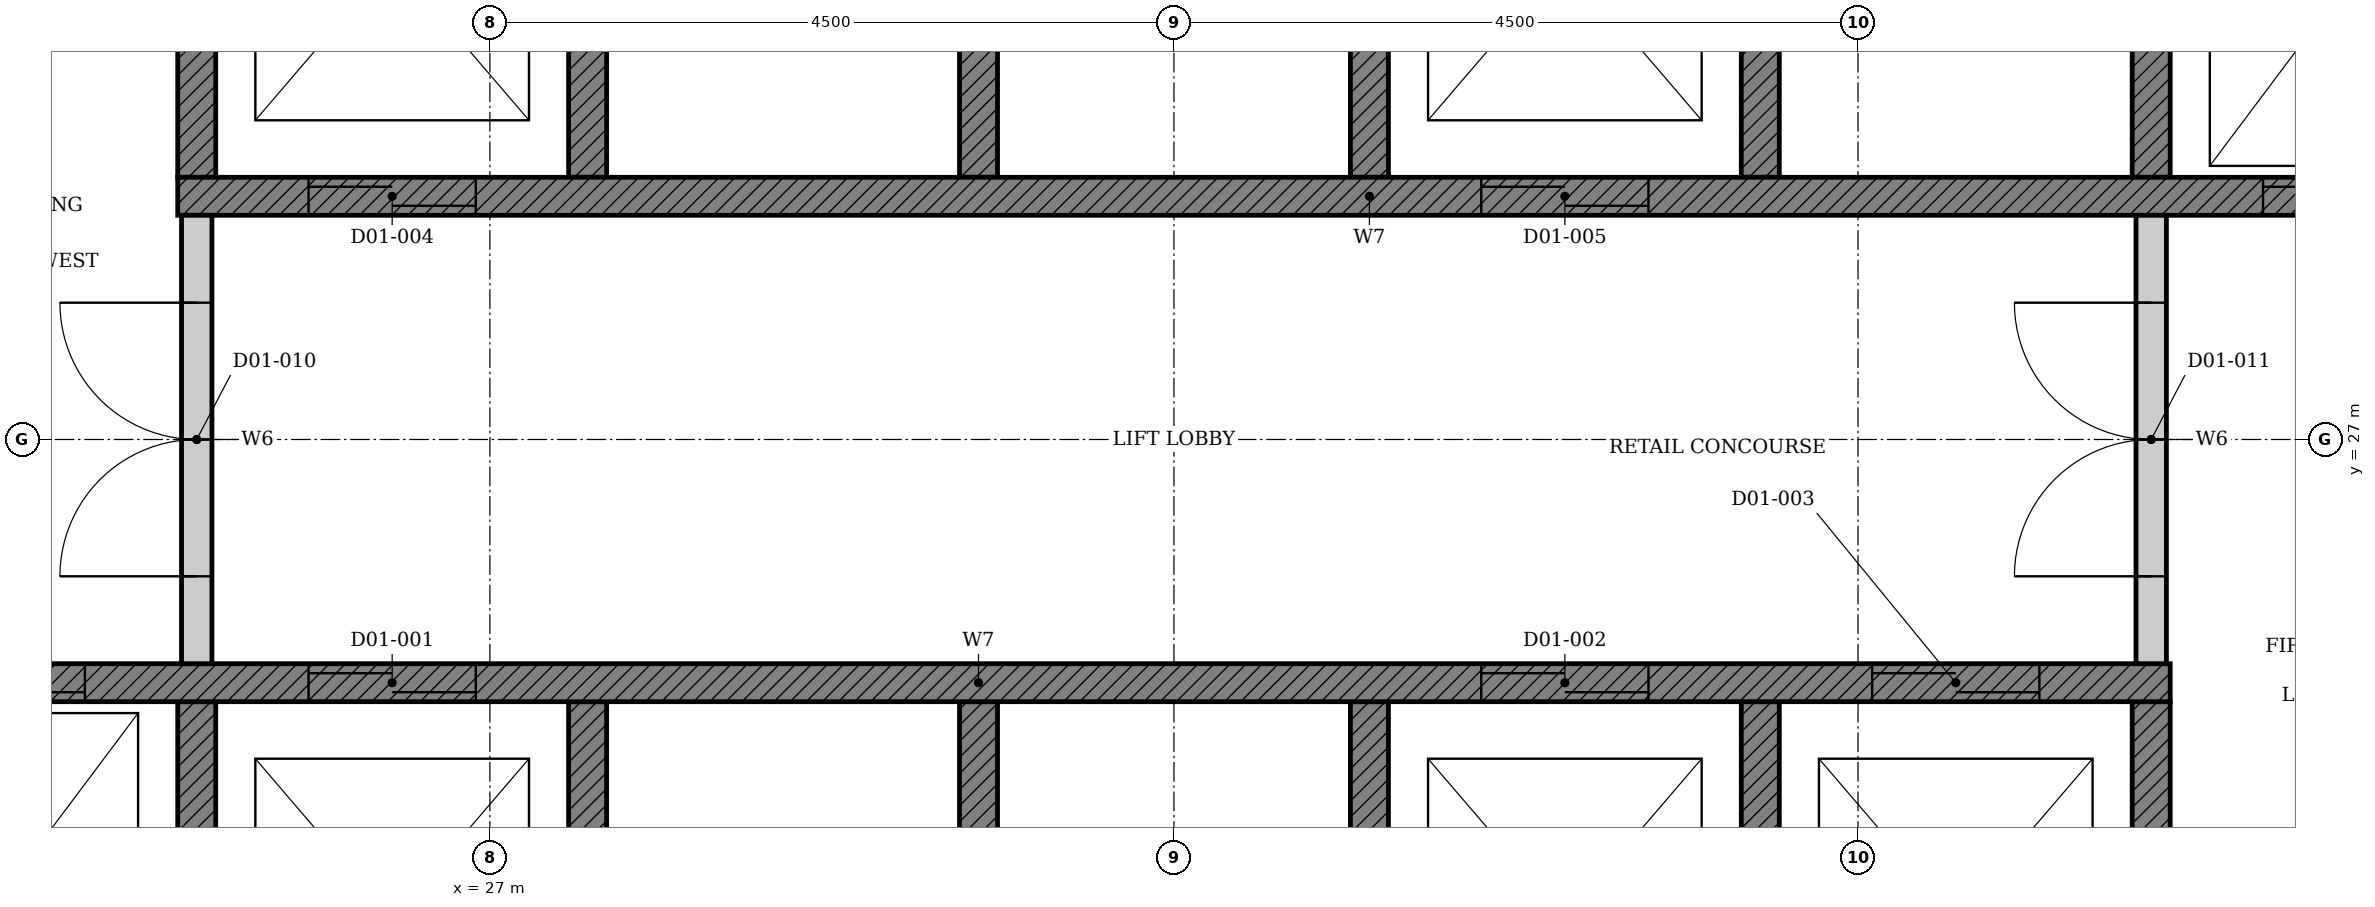
"""IFC4 building model, lengths in metres.
Left out: names, types, materials, properties, quantities, classifications, styles, units other than length and angle.
Written with IfcOpenShell. Run it as: python <this file> out.ifc"""

import sys

from ifc_helpers import new_model, si_unit, direction, frame, frame_2d, origin, place, context, subcontext, project, spatial, polyline, rectangle, outline, extrude, element, fill, save


model = new_model("IFC4")
c1 = context("Model", 3, precision=1e-05, world=origin(), true_north=direction((0.0, 1.0)))
c2 = subcontext(c1, "Body", "Model", "MODEL_VIEW")
j1 = project(units=[si_unit("LENGTHUNIT", "METRE"), si_unit("PLANEANGLEUNIT", "RADIAN")], contexts=[c1])
p1 = place(None, origin())
s1 = spatial("IfcSite", under=j1, at=p1, CompositionType="ELEMENT")
p2 = place(p1, origin())
s2 = spatial("IfcBuilding", under=s1, at=p2, CompositionType="ELEMENT")
p3 = place(p2, frame((0.0, 0.0, 6.6)))
s3 = spatial("IfcBuildingStorey", under=s2, at=p3, CompositionType="ELEMENT", Elevation=6.6)
p4 = place(p3, origin())
e1 = element("IfcWall", 1, at=p4, inside=s3, PredefinedType="SHEAR", context=c2, shape_type="SweptSolid", body=[
    extrude(outline(polyline([(22.375, 22.35), (38.053, 22.35), (38.053, 25.275), (37.803, 25.275), (37.803, 22.65), (35.482, 22.65), (35.482, 25.275), (35.232, 25.275), (35.232, 22.65), (32.911, 22.65), (32.911, 25.275), (32.661, 25.275), (32.661, 22.65), (30.339, 22.65), (30.339, 25.275), (30.089, 25.275), (30.089, 22.65), (27.768, 22.65), (27.768, 25.275), (27.518, 25.275), (27.518, 22.65), (25.197, 22.65), (25.197, 25.275), (24.947, 25.275), (24.947, 22.65), (22.625, 22.65), (22.625, 25.275), (22.375, 25.275), (22.375, 22.35)])), origin(), (0.0, 0.0, 1.0), 5.05),
])
p5 = place(p3, origin())
e2 = element("IfcWall", 2, at=p5, inside=s3, PredefinedType="SHEAR", context=c2, shape_type="SweptSolid", body=[
    extrude(outline(polyline([(24.947, 28.725), (25.197, 28.725), (25.197, 31.35), (27.518, 31.35), (27.518, 28.725), (27.768, 28.725), (27.768, 31.35), (30.089, 31.35), (30.089, 28.725), (30.339, 28.725), (30.339, 31.35), (32.661, 31.35), (32.661, 28.725), (32.911, 28.725), (32.911, 31.35), (35.232, 31.35), (35.232, 28.725), (35.482, 28.725), (35.482, 31.35), (37.803, 31.35), (37.803, 28.725), (38.053, 28.725), (38.053, 31.35), (40.375, 31.35), (40.375, 28.725), (40.625, 28.725), (40.625, 31.65), (24.947, 31.65), (24.947, 28.725)])), origin(), (0.0, 0.0, 1.0), 5.05),
])
p6 = place(p3, frame((22.375, 25.4, 0.0), z_axis=(0.0, 0.0, 1.0), x_axis=(1.0, 0.0, 0.0)))
e3 = element("IfcWall", 3, at=p6, inside=s3, PredefinedType="SHEAR", context=c2, shape_type="SweptSolid", body=[
    extrude(rectangle(XDim=15.678, YDim=0.25, at=frame_2d((7.839, 0.0))), origin(), (0.0, 0.0, 1.0), 5.05),
])
p7 = place(p6, frame((3.432, 0.0, 0.0)))
e4 = element("IfcOpeningElement", 4, at=p7, cuts=e3, PredefinedType="OPENING", context=c2, shape_type="SweptSolid", body=[
    extrude(rectangle(XDim=1.1, YDim=2.1, at=frame_2d((0.55, 1.05))), frame((0.0, 0.135, 0.0), z_axis=(0.0, -1.0, 0.0), x_axis=(1.0, 0.0, 0.0)), (0.0, 0.0, 1.0), 0.27),
])
p8 = place(p6, frame((11.146, 0.0, 0.0)))
e5 = element("IfcOpeningElement", 5, at=p8, cuts=e3, PredefinedType="OPENING", context=c2, shape_type="SweptSolid", body=[
    extrude(rectangle(XDim=1.1, YDim=2.1, at=frame_2d((0.55, 1.05))), frame((0.0, 0.135, 0.0), z_axis=(0.0, -1.0, 0.0), x_axis=(1.0, 0.0, 0.0)), (0.0, 0.0, 1.0), 0.27),
])
p9 = place(p6, frame((13.718, 0.0, 0.0)))
e6 = element("IfcOpeningElement", 6, at=p9, cuts=e3, PredefinedType="OPENING", context=c2, shape_type="SweptSolid", body=[
    extrude(rectangle(XDim=1.1, YDim=2.1, at=frame_2d((0.55, 1.05))), frame((0.0, 0.135, 0.0), z_axis=(0.0, -1.0, 0.0), x_axis=(1.0, 0.0, 0.0)), (0.0, 0.0, 1.0), 0.27),
])
p10 = place(p6, frame((0.861, 0.0, 0.0)))
e7 = element("IfcOpeningElement", 7, at=p10, cuts=e3, PredefinedType="OPENING", context=c2, shape_type="SweptSolid", body=[
    extrude(rectangle(XDim=1.1, YDim=2.1, at=frame_2d((0.55, 1.05))), frame((0.0, 0.135, 0.0), z_axis=(0.0, -1.0, 0.0), x_axis=(1.0, 0.0, 0.0)), (0.0, 0.0, 1.0), 0.27),
])
p11 = place(p3, frame((24.947, 28.6, 0.0), z_axis=(0.0, 0.0, 1.0), x_axis=(1.0, 0.0, 0.0)))
e8 = element("IfcWall", 8, at=p11, inside=s3, PredefinedType="SHEAR", context=c2, shape_type="SweptSolid", body=[
    extrude(rectangle(XDim=15.678, YDim=0.25, at=frame_2d((7.839, 0.0))), origin(), (0.0, 0.0, 1.0), 5.05),
])
p12 = place(p11, frame((0.861, 0.0, 0.0)))
e9 = element("IfcOpeningElement", 9, at=p12, cuts=e8, PredefinedType="OPENING", context=c2, shape_type="SweptSolid", body=[
    extrude(rectangle(XDim=1.1, YDim=2.1, at=frame_2d((0.55, 1.05))), frame((0.0, 0.135, 0.0), z_axis=(0.0, -1.0, 0.0), x_axis=(1.0, 0.0, 0.0)), (0.0, 0.0, 1.0), 0.27),
])
p13 = place(p11, frame((8.575, 0.0, 0.0)))
e10 = element("IfcOpeningElement", 10, at=p13, cuts=e8, PredefinedType="OPENING", context=c2, shape_type="SweptSolid", body=[
    extrude(rectangle(XDim=1.1, YDim=2.1, at=frame_2d((0.55, 1.05))), frame((0.0, 0.135, 0.0), z_axis=(0.0, -1.0, 0.0), x_axis=(1.0, 0.0, 0.0)), (0.0, 0.0, 1.0), 0.27),
])
p14 = place(p11, frame((13.718, 0.0, 0.0)))
e11 = element("IfcOpeningElement", 11, at=p14, cuts=e8, PredefinedType="OPENING", context=c2, shape_type="SweptSolid", body=[
    extrude(rectangle(XDim=1.1, YDim=2.1, at=frame_2d((0.55, 1.05))), frame((0.0, 0.135, 0.0), z_axis=(0.0, -1.0, 0.0), x_axis=(1.0, 0.0, 0.0)), (0.0, 0.0, 1.0), 0.27),
])
p15 = place(p3, frame((25.072, 25.525, 0.0), z_axis=(0.0, 0.0, 1.0), x_axis=(0.0, 1.0, 0.0)))
e12 = element("IfcWall", 12, at=p15, inside=s3, PredefinedType="PARTITIONING", context=c2, shape_type="SweptSolid", body=[
    extrude(rectangle(XDim=2.95, YDim=0.2, at=frame_2d((1.475, 0.0))), origin(), (0.0, 0.0, 1.0), 5.05),
])
p16 = place(p15, frame((0.575, 0.0, 0.0)))
e13 = element("IfcOpeningElement", 13, at=p16, cuts=e12, PredefinedType="OPENING", context=c2, shape_type="SweptSolid", body=[
    extrude(rectangle(XDim=1.8, YDim=2.1, at=frame_2d((0.9, 1.05))), frame((0.0, 0.11, 0.0), z_axis=(0.0, -1.0, 0.0), x_axis=(1.0, 0.0, 0.0)), (0.0, 0.0, 1.0), 0.22),
])
p17 = place(p3, frame((37.928, 25.525, 0.0), z_axis=(0.0, 0.0, 1.0), x_axis=(0.0, 1.0, 0.0)))
e14 = element("IfcWall", 14, at=p17, inside=s3, PredefinedType="PARTITIONING", context=c2, shape_type="SweptSolid", body=[
    extrude(rectangle(XDim=2.95, YDim=0.2, at=frame_2d((1.475, 0.0))), origin(), (0.0, 0.0, 1.0), 5.05),
])
p18 = place(p17, frame((0.575, 0.0, 0.0)))
e15 = element("IfcOpeningElement", 15, at=p18, cuts=e14, PredefinedType="OPENING", context=c2, shape_type="SweptSolid", body=[
    extrude(rectangle(XDim=1.8, YDim=2.1, at=frame_2d((0.9, 1.05))), frame((0.0, 0.11, 0.0), z_axis=(0.0, -1.0, 0.0), x_axis=(1.0, 0.0, 0.0)), (0.0, 0.0, 1.0), 0.22),
])
p19 = place(p7, origin())
e16 = element("IfcDoor", 16, at=p19, inside=s3, OperationType="DOUBLE_DOOR_SLIDING", PredefinedType="DOOR", context=c2, shape_type="SweptSolid", body=[
    extrude(rectangle(XDim=1.1, YDim=2.1, at=frame_2d((0.55, 1.05))), frame((0.0, 0.025, 0.0), z_axis=(0.0, -1.0, 0.0), x_axis=(1.0, 0.0, 0.0)), (0.0, 0.0, 1.0), 0.05),
])
fill(e4, e16)
p20 = place(p8, origin())
e17 = element("IfcDoor", 17, at=p20, inside=s3, OperationType="DOUBLE_DOOR_SLIDING", PredefinedType="DOOR", context=c2, shape_type="SweptSolid", body=[
    extrude(rectangle(XDim=1.1, YDim=2.1, at=frame_2d((0.55, 1.05))), frame((0.0, 0.025, 0.0), z_axis=(0.0, -1.0, 0.0), x_axis=(1.0, 0.0, 0.0)), (0.0, 0.0, 1.0), 0.05),
])
fill(e5, e17)
p21 = place(p9, origin())
e18 = element("IfcDoor", 18, at=p21, inside=s3, OperationType="DOUBLE_DOOR_SLIDING", PredefinedType="DOOR", context=c2, shape_type="SweptSolid", body=[
    extrude(rectangle(XDim=1.1, YDim=2.1, at=frame_2d((0.55, 1.05))), frame((0.0, 0.025, 0.0), z_axis=(0.0, -1.0, 0.0), x_axis=(1.0, 0.0, 0.0)), (0.0, 0.0, 1.0), 0.05),
])
fill(e6, e18)
p22 = place(p12, origin())
e19 = element("IfcDoor", 19, at=p22, inside=s3, OperationType="DOUBLE_DOOR_SLIDING", PredefinedType="DOOR", context=c2, shape_type="SweptSolid", body=[
    extrude(rectangle(XDim=1.1, YDim=2.1, at=frame_2d((0.55, 1.05))), frame((0.0, 0.025, 0.0), z_axis=(0.0, -1.0, 0.0), x_axis=(1.0, 0.0, 0.0)), (0.0, 0.0, 1.0), 0.05),
])
fill(e9, e19)
p23 = place(p13, origin())
e20 = element("IfcDoor", 20, at=p23, inside=s3, OperationType="DOUBLE_DOOR_SLIDING", PredefinedType="DOOR", context=c2, shape_type="SweptSolid", body=[
    extrude(rectangle(XDim=1.1, YDim=2.1, at=frame_2d((0.55, 1.05))), frame((0.0, 0.025, 0.0), z_axis=(0.0, -1.0, 0.0), x_axis=(1.0, 0.0, 0.0)), (0.0, 0.0, 1.0), 0.05),
])
fill(e10, e20)
p24 = place(p10, origin())
e21 = element("IfcDoor", 21, at=p24, inside=s3, OperationType="DOUBLE_DOOR_SLIDING", PredefinedType="DOOR", context=c2, shape_type="SweptSolid", body=[
    extrude(rectangle(XDim=1.1, YDim=2.1, at=frame_2d((0.55, 1.05))), frame((0.0, 0.025, 0.0), z_axis=(0.0, -1.0, 0.0), x_axis=(1.0, 0.0, 0.0)), (0.0, 0.0, 1.0), 0.05),
])
fill(e7, e21)
p25 = place(p14, origin())
e22 = element("IfcDoor", 22, at=p25, inside=s3, OperationType="DOUBLE_DOOR_SLIDING", PredefinedType="DOOR", context=c2, shape_type="SweptSolid", body=[
    extrude(rectangle(XDim=1.1, YDim=2.1, at=frame_2d((0.55, 1.05))), frame((0.0, 0.025, 0.0), z_axis=(0.0, -1.0, 0.0), x_axis=(1.0, 0.0, 0.0)), (0.0, 0.0, 1.0), 0.05),
])
fill(e11, e22)
p26 = place(p16, origin())
e23 = element("IfcDoor", 23, at=p26, inside=s3, OperationType="DOUBLE_DOOR_SINGLE_SWING", PredefinedType="DOOR", context=c2, shape_type="SweptSolid", body=[
    extrude(rectangle(XDim=1.8, YDim=2.1, at=frame_2d((0.9, 1.05))), frame((0.0, 0.025, 0.0), z_axis=(0.0, -1.0, 0.0), x_axis=(1.0, 0.0, 0.0)), (0.0, 0.0, 1.0), 0.05),
])
fill(e13, e23)
p27 = place(p18, origin())
e24 = element("IfcDoor", 24, at=p27, inside=s3, OperationType="DOUBLE_DOOR_SINGLE_SWING", PredefinedType="DOOR", context=c2, shape_type="SweptSolid", body=[
    extrude(rectangle(XDim=1.8, YDim=2.1, at=frame_2d((0.9, 1.05))), frame((0.0, 0.025, 0.0), z_axis=(0.0, -1.0, 0.0), x_axis=(1.0, 0.0, 0.0)), (0.0, 0.0, 1.0), 0.05),
])
fill(e15, e24)
save(model, sys.argv[1])
